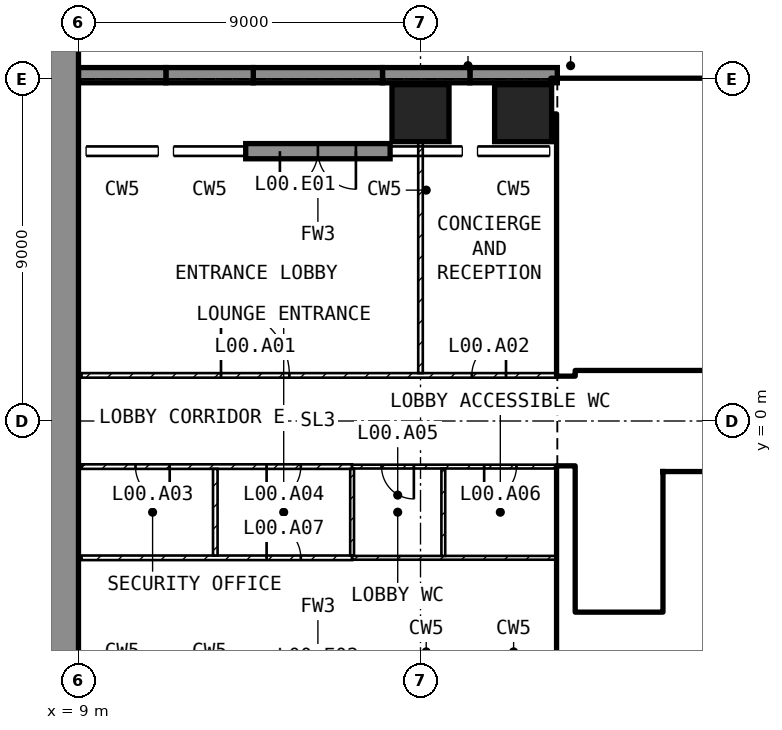
"""IFC4 building model, lengths in metres.
Left out: names, types, materials, properties, quantities, classifications, styles, units other than length and angle.
Written with IfcOpenShell. Run it as: python <this file> out.ifc"""

import sys

from ifc_helpers import new_model, si_unit, direction, frame, frame_2d, origin, origin_2d, place, context, subcontext, project, spatial, polyline, rectangle, outline, extrude, element, fill, save


model = new_model("IFC4")
c1 = context("Model", 3, precision=1e-05, world=origin(), true_north=direction((0.0, 1.0)))
c2 = subcontext(c1, "Body", "Model", "MODEL_VIEW")
j1 = project(units=[si_unit("LENGTHUNIT", "METRE"), si_unit("PLANEANGLEUNIT", "RADIAN")], contexts=[c1])
p1 = place(None, origin())
s1 = spatial("IfcSite", under=j1, at=p1, CompositionType="ELEMENT")
p2 = place(p1, origin())
s2 = spatial("IfcBuilding", under=s1, at=p2, CompositionType="ELEMENT")
p3 = place(p2, origin())
s3 = spatial("IfcBuildingStorey", under=s2, at=p3, CompositionType="ELEMENT", Elevation=0.0)
p4 = place(p3, frame((7.65, -25.2, -0.4), z_axis=(0.0, 0.0, 1.0), x_axis=(0.0, 1.0, 0.0)))
e1 = element("IfcWall", 1, at=p4, inside=s3, PredefinedType="SOLIDWALL", context=c2, shape_type="SweptSolid", body=[
    extrude(rectangle(XDim=50.4, YDim=2.7, at=frame_2d((25.2, 0.0))), origin(), (0.0, 0.0, 1.0), 20.0),
])
for number, where, z_axis, x_axis in (
    (2, (18.0, 8.1, -0.4), (0.0, 0.0, 1.0), (1.0, 0.0, 0.0)),
    (3, (20.7, 8.1, -0.4), (0.0, 0.0, 1.0), (1.0, 0.0, 0.0)),
):
    element("IfcColumn", number, at=place(p3, frame(where, z_axis=z_axis, x_axis=x_axis)), inside=s3, PredefinedType="COLUMN", context=c2, shape_type="SweptSolid", body=[
        extrude(rectangle(XDim=1.5, YDim=1.5, at=origin_2d()), origin(), (0.0, 0.0, 1.0), 15.1),
    ])
for number, where, z_axis, x_axis in (
    (4, (21.6, 8.9, 0.0), (0.0, 1.0, 0.0), (-1.0, 0.0, 0.0)),
    (5, (19.3, 8.9, 0.0), (0.0, 1.0, 0.0), (-1.0, 0.0, 0.0)),
):
    element("IfcWall", number, at=place(p3, frame(where, z_axis=z_axis, x_axis=x_axis)), inside=s3, PredefinedType="SOLIDWALL", context=c2, shape_type="SweptSolid", body=[
        extrude(outline(polyline([(0.0, 0.0), (0.3, 0.0), (0.3, 9.0), (0.316, 9.166), (0.365, 9.325), (0.443, 9.472), (0.549, 9.601), (0.678, 9.707), (0.825, 9.785), (0.984, 9.834), (1.15, 9.85), (1.316, 9.834), (1.475, 9.785), (1.622, 9.707), (1.751, 9.601), (1.857, 9.472), (1.935, 9.325), (1.984, 9.166), (2.0, 9.0), (2.0, 0.0), (2.3, 0.0), (2.3, 14.0), (0.0, 14.0), (0.0, 0.0)])), origin(), (0.0, 0.0, 1.0), 0.4),
    ])
p5 = place(p3, frame((17.0, 8.9, 0.0), z_axis=(0.0, 1.0, 0.0), x_axis=(-1.0, 0.0, 0.0)))
e6 = element("IfcWall", 6, at=p5, inside=s3, PredefinedType="SOLIDWALL", context=c2, shape_type="SweptSolid", body=[
    extrude(outline(polyline([(0.0, 0.0), (0.3, 0.0), (0.3, 9.0), (0.327, 9.273), (0.406, 9.536), (0.536, 9.778), (0.71, 9.99), (0.922, 10.164), (1.164, 10.293), (1.427, 10.373), (1.7, 10.4), (1.973, 10.373), (2.236, 10.293), (2.478, 10.164), (2.69, 9.99), (2.864, 9.778), (2.993, 9.536), (3.073, 9.273), (3.1, 9.0), (3.1, 0.0), (3.4, 0.0), (3.4, 14.0), (0.0, 14.0), (0.0, 0.0)])), origin(), (0.0, 0.0, 1.0), 0.4),
])
p6 = place(p3, frame((17.2, 7.1, 0.0), z_axis=(0.0, 0.0, 1.0), x_axis=(-1.0, 0.0, 0.0)))
e7 = element("IfcWall", 7, at=p6, inside=s3, PredefinedType="SOLIDWALL", context=c2, shape_type="SweptSolid", body=[
    extrude(rectangle(XDim=3.8, YDim=0.4, at=frame_2d((1.9, 0.0))), origin(), (0.0, 0.0, 1.0), 14.7),
])
p7 = place(p6, frame((0.9, 0.0, 0.0)))
e8 = element("IfcOpeningElement", 8, at=p7, cuts=e7, PredefinedType="OPENING", context=c2, shape_type="SweptSolid", body=[
    extrude(rectangle(XDim=2.0, YDim=2.4, at=frame_2d((1.0, 1.2))), frame((0.0, 0.21, 0.0), z_axis=(0.0, -1.0, 0.0), x_axis=(1.0, 0.0, 0.0)), (0.0, 0.0, 1.0), 0.42),
])
for number, where, z_axis, x_axis in (
    (9, (13.6, 8.9, 0.0), (0.0, 1.0, 0.0), (-1.0, 0.0, 0.0)),
    (10, (11.3, 8.9, 0.0), (0.0, 1.0, 0.0), (-1.0, 0.0, 0.0)),
):
    element("IfcWall", number, at=place(p3, frame(where, z_axis=z_axis, x_axis=x_axis)), inside=s3, PredefinedType="SOLIDWALL", context=c2, shape_type="SweptSolid", body=[
        extrude(outline(polyline([(0.0, 0.0), (0.3, 0.0), (0.3, 9.0), (0.316, 9.166), (0.365, 9.325), (0.443, 9.472), (0.549, 9.601), (0.678, 9.707), (0.825, 9.785), (0.984, 9.834), (1.15, 9.85), (1.316, 9.834), (1.475, 9.785), (1.622, 9.707), (1.751, 9.601), (1.857, 9.472), (1.935, 9.325), (1.984, 9.166), (2.0, 9.0), (2.0, 0.0), (2.3, 0.0), (2.3, 14.0), (0.0, 14.0), (0.0, 0.0)])), origin(), (0.0, 0.0, 1.0), 0.4),
    ])
p8 = place(p3, frame((21.45, 8.55, 0.0), z_axis=(0.0, 0.0, 1.0), x_axis=(1.0, 0.0, 0.0)))
e11 = element("IfcWall", 11, at=p8, inside=s3, PredefinedType="SHEAR", context=c2, shape_type="SweptSolid", body=[
    extrude(rectangle(XDim=10.05, YDim=0.9, at=frame_2d((5.025, 0.0))), origin(), (0.0, 0.0, 1.0), 14.7),
])
p9 = place(p8, frame((0.8, 0.0, 0.0)))
e12 = element("IfcOpeningElement", 12, at=p9, cuts=e11, PredefinedType="OPENING", context=c2, shape_type="SweptSolid", body=[
    extrude(rectangle(XDim=1.0, YDim=2.1, at=frame_2d((0.5, 1.05))), frame((0.0, 0.46, 0.0), z_axis=(0.0, -1.0, 0.0), x_axis=(1.0, 0.0, 0.0)), (0.0, 0.0, 1.0), 0.92),
])
for number, where, z_axis, x_axis in (
    (13, (21.825, -8.1, 0.0), (0.0, 0.0, 1.0), (0.0, 1.0, 0.0)),
    (14, (21.825, 1.2, 0.0), (0.0, 0.0, 1.0), (0.0, 1.0, 0.0)),
):
    element("IfcWall", number, at=place(p3, frame(where, z_axis=z_axis, x_axis=x_axis)), inside=s3, PredefinedType="SHEAR", context=c2, shape_type="SweptSolid", body=[
        extrude(rectangle(XDim=6.9, YDim=0.45, at=frame_2d((3.45, 0.0))), origin(), (0.0, 0.0, 1.0), 14.7),
    ])
p10 = place(p3, frame((22.05, 1.45, 0.0), z_axis=(0.0, 0.0, 1.0), x_axis=(1.0, 0.0, 0.0)))
e15 = element("IfcWall", 15, at=p10, inside=s3, PredefinedType="SOLIDWALL", context=c2, shape_type="SweptSolid", body=[
    extrude(rectangle(XDim=13.05, YDim=0.2, at=frame_2d((6.525, 0.0))), origin(), (0.0, 0.0, 1.0), 14.7),
])
p11 = place(p10, frame((8.6, 0.0, 0.0)))
e16 = element("IfcOpeningElement", 16, at=p11, cuts=e15, PredefinedType="OPENING", context=c2, shape_type="SweptSolid", body=[
    extrude(rectangle(XDim=1.0, YDim=2.1, at=frame_2d((0.5, 1.05))), frame((0.0, 0.11, 0.0), z_axis=(0.0, -1.0, 0.0), x_axis=(1.0, 0.0, 0.0)), (0.0, 0.0, 1.0), 0.22),
])
p12 = place(p10, frame((11.1, 0.0, 0.0)))
e17 = element("IfcOpeningElement", 17, at=p12, cuts=e15, PredefinedType="OPENING", context=c2, shape_type="SweptSolid", body=[
    extrude(rectangle(XDim=1.0, YDim=2.1, at=frame_2d((0.5, 1.05))), frame((0.0, 0.11, 0.0), z_axis=(0.0, -1.0, 0.0), x_axis=(1.0, 0.0, 0.0)), (0.0, 0.0, 1.0), 0.22),
])
p13 = place(p10, frame((0.75, 0.0, 0.0)))
e18 = element("IfcOpeningElement", 18, at=p13, cuts=e15, PredefinedType="OPENING", context=c2, shape_type="SweptSolid", body=[
    extrude(rectangle(XDim=1.0, YDim=2.1, at=frame_2d((0.5, 1.05))), frame((0.0, 0.11, 0.0), z_axis=(0.0, -1.0, 0.0), x_axis=(1.0, 0.0, 0.0)), (0.0, 0.0, 1.0), 0.22),
])
p14 = place(p10, frame((3.25, 0.0, 0.0)))
e19 = element("IfcOpeningElement", 19, at=p14, cuts=e15, PredefinedType="OPENING", context=c2, shape_type="SweptSolid", body=[
    extrude(rectangle(XDim=1.0, YDim=2.1, at=frame_2d((0.5, 1.05))), frame((0.0, 0.11, 0.0), z_axis=(0.0, -1.0, 0.0), x_axis=(1.0, 0.0, 0.0)), (0.0, 0.0, 1.0), 0.22),
])
p15 = place(p3, frame((24.5, -5.05, 0.0), z_axis=(0.0, 0.0, 1.0), x_axis=(0.0, 1.0, 0.0)))
e20 = element("IfcWall", 20, at=p15, inside=s3, PredefinedType="SOLIDWALL", context=c2, shape_type="SweptSolid", body=[
    extrude(rectangle(XDim=3.7, YDim=0.2, at=frame_2d((1.85, 0.0))), origin(), (0.0, 0.0, 1.0), 14.7),
])
p16 = place(p15, frame((0.1, 0.0, 0.0)))
e21 = element("IfcOpeningElement", 21, at=p16, cuts=e20, PredefinedType="OPENING", context=c2, shape_type="SweptSolid", body=[
    extrude(rectangle(XDim=0.8, YDim=2.1, at=frame_2d((0.4, 1.05))), frame((0.0, 0.11, 0.0), z_axis=(0.0, -1.0, 0.0), x_axis=(1.0, 0.0, 0.0)), (0.0, 0.0, 1.0), 0.22),
])
p17 = place(p3, frame((22.05, 5.15, 0.0), z_axis=(0.0, 0.0, 1.0), x_axis=(1.0, 0.0, 0.0)))
e22 = element("IfcWall", 22, at=p17, inside=s3, PredefinedType="SOLIDWALL", context=c2, shape_type="SweptSolid", body=[
    extrude(rectangle(XDim=6.3, YDim=0.2, at=frame_2d((3.15, 0.0))), origin(), (0.0, 0.0, 1.0), 14.7),
])
p18 = place(p17, frame((0.2, 0.0, 0.0)))
e23 = element("IfcOpeningElement", 23, at=p18, cuts=e22, PredefinedType="OPENING", context=c2, shape_type="SweptSolid", body=[
    extrude(rectangle(XDim=1.0, YDim=2.1, at=frame_2d((0.5, 1.05))), frame((0.0, 0.11, 0.0), z_axis=(0.0, -1.0, 0.0), x_axis=(1.0, 0.0, 0.0)), (0.0, 0.0, 1.0), 0.22),
])
p19 = place(p3, frame((22.05, -5.15, 0.0), z_axis=(0.0, 0.0, 1.0), x_axis=(1.0, 0.0, 0.0)))
e24 = element("IfcWall", 24, at=p19, inside=s3, PredefinedType="SOLIDWALL", context=c2, shape_type="SweptSolid", body=[
    extrude(rectangle(XDim=6.3, YDim=0.2, at=frame_2d((3.15, 0.0))), origin(), (0.0, 0.0, 1.0), 14.7),
])
p20 = place(p19, frame((0.2, 0.0, 0.0)))
e25 = element("IfcOpeningElement", 25, at=p20, cuts=e24, PredefinedType="OPENING", context=c2, shape_type="SweptSolid", body=[
    extrude(rectangle(XDim=1.0, YDim=2.1, at=frame_2d((0.5, 1.05))), frame((0.0, 0.11, 0.0), z_axis=(0.0, -1.0, 0.0), x_axis=(1.0, 0.0, 0.0)), (0.0, 0.0, 1.0), 0.22),
])
p21 = place(p3, frame((24.6, -1.45, 0.0), z_axis=(0.0, 0.0, 1.0), x_axis=(1.0, 0.0, 0.0)))
e26 = element("IfcWall", 26, at=p21, inside=s3, PredefinedType="SOLIDWALL", context=c2, shape_type="SweptSolid", body=[
    extrude(rectangle(XDim=10.5, YDim=0.2, at=frame_2d((5.25, 0.0))), origin(), (0.0, 0.0, 1.0), 14.7),
])
p22 = place(p21, frame((6.2, 0.0, 0.0)))
e27 = element("IfcOpeningElement", 27, at=p22, cuts=e26, PredefinedType="OPENING", context=c2, shape_type="SweptSolid", body=[
    extrude(rectangle(XDim=1.0, YDim=2.1, at=frame_2d((0.5, 1.05))), frame((0.0, 0.11, 0.0), z_axis=(0.0, -1.0, 0.0), x_axis=(1.0, 0.0, 0.0)), (0.0, 0.0, 1.0), 0.22),
])
p23 = place(p21, frame((7.75, 0.0, 0.0)))
e28 = element("IfcOpeningElement", 28, at=p23, cuts=e26, PredefinedType="OPENING", context=c2, shape_type="SweptSolid", body=[
    extrude(rectangle(XDim=1.0, YDim=2.1, at=frame_2d((0.5, 1.05))), frame((0.0, 0.11, 0.0), z_axis=(0.0, -1.0, 0.0), x_axis=(1.0, 0.0, 0.0)), (0.0, 0.0, 1.0), 0.22),
])
p24 = place(p21, frame((9.3, 0.0, 0.0)))
e29 = element("IfcOpeningElement", 29, at=p24, cuts=e26, PredefinedType="OPENING", context=c2, shape_type="SweptSolid", body=[
    extrude(rectangle(XDim=1.0, YDim=2.1, at=frame_2d((0.5, 1.05))), frame((0.0, 0.11, 0.0), z_axis=(0.0, -1.0, 0.0), x_axis=(1.0, 0.0, 0.0)), (0.0, 0.0, 1.0), 0.22),
])
p25 = place(p21, frame((0.45, 0.0, 0.0)))
e30 = element("IfcOpeningElement", 30, at=p25, cuts=e26, PredefinedType="OPENING", context=c2, shape_type="SweptSolid", body=[
    extrude(rectangle(XDim=0.9, YDim=2.1, at=frame_2d((0.45, 1.05))), frame((0.0, 0.11, 0.0), z_axis=(0.0, -1.0, 0.0), x_axis=(1.0, 0.0, 0.0)), (0.0, 0.0, 1.0), 0.22),
])
p26 = place(p21, frame((3.45, 0.0, 0.0)))
e31 = element("IfcOpeningElement", 31, at=p26, cuts=e26, PredefinedType="OPENING", context=c2, shape_type="SweptSolid", body=[
    extrude(rectangle(XDim=0.9, YDim=2.1, at=frame_2d((0.45, 1.05))), frame((0.0, 0.11, 0.0), z_axis=(0.0, -1.0, 0.0), x_axis=(1.0, 0.0, 0.0)), (0.0, 0.0, 1.0), 0.22),
])
p27 = place(p3, frame((24.6, -3.95, 0.0), z_axis=(0.0, 0.0, 1.0), x_axis=(1.0, 0.0, 0.0)))
e32 = element("IfcWall", 32, at=p27, inside=s3, PredefinedType="SOLIDWALL", context=c2, shape_type="SweptSolid", body=[
    extrude(rectangle(XDim=10.5, YDim=0.2, at=frame_2d((5.25, 0.0))), origin(), (0.0, 0.0, 1.0), 14.7),
])
p28 = place(p3, frame((9.08, 1.2, 0.0), z_axis=(0.0, 0.0, 1.0), x_axis=(1.0, 0.0, 0.0)))
e33 = element("IfcWall", 33, at=p28, inside=s3, PredefinedType="PARTITIONING", context=c2, shape_type="SweptSolid", body=[
    extrude(rectangle(XDim=12.52, YDim=0.12, at=frame_2d((6.26, 0.0))), origin(), (0.0, 0.0, 1.0), 14.7),
])
p29 = place(p28, frame((3.67, 0.0, 0.0)))
e34 = element("IfcOpeningElement", 34, at=p29, cuts=e33, PredefinedType="OPENING", context=c2, shape_type="SweptSolid", body=[
    extrude(rectangle(XDim=1.8, YDim=2.1, at=frame_2d((0.9, 1.05))), frame((0.0, 0.07, 0.0), z_axis=(0.0, -1.0, 0.0), x_axis=(1.0, 0.0, 0.0)), (0.0, 0.0, 1.0), 0.14),
])
p30 = place(p28, frame((10.27, 0.0, 0.0)))
e35 = element("IfcOpeningElement", 35, at=p30, cuts=e33, PredefinedType="OPENING", context=c2, shape_type="SweptSolid", body=[
    extrude(rectangle(XDim=0.9, YDim=2.1, at=frame_2d((0.45, 1.05))), frame((0.0, 0.07, 0.0), z_axis=(0.0, -1.0, 0.0), x_axis=(1.0, 0.0, 0.0)), (0.0, 0.0, 1.0), 0.14),
])
p31 = place(p3, frame((16.2, -1.2, 0.0), z_axis=(0.0, 0.0, 1.0), x_axis=(-1.0, 0.0, 0.0)))
e36 = element("IfcWall", 36, at=p31, inside=s3, PredefinedType="PARTITIONING", context=c2, shape_type="SweptSolid", body=[
    extrude(rectangle(XDim=7.12, YDim=0.12, at=frame_2d((3.56, 0.0))), origin(), (0.0, 0.0, 1.0), 14.7),
])
p32 = place(p31, frame((4.8, 0.0, 0.0)))
e37 = element("IfcOpeningElement", 37, at=p32, cuts=e36, PredefinedType="OPENING", context=c2, shape_type="SweptSolid", body=[
    extrude(rectangle(XDim=0.9, YDim=2.1, at=frame_2d((0.45, 1.05))), frame((0.0, 0.07, 0.0), z_axis=(0.0, -1.0, 0.0), x_axis=(1.0, 0.0, 0.0)), (0.0, 0.0, 1.0), 0.14),
])
p33 = place(p31, frame((1.35, 0.0, 0.0)))
e38 = element("IfcOpeningElement", 38, at=p33, cuts=e36, PredefinedType="OPENING", context=c2, shape_type="SweptSolid", body=[
    extrude(rectangle(XDim=0.9, YDim=2.1, at=frame_2d((0.45, 1.05))), frame((0.0, 0.07, 0.0), z_axis=(0.0, -1.0, 0.0), x_axis=(1.0, 0.0, 0.0)), (0.0, 0.0, 1.0), 0.14),
])
p34 = place(p3, frame((21.6, -1.2, 0.0), z_axis=(0.0, 0.0, 1.0), x_axis=(-1.0, 0.0, 0.0)))
e39 = element("IfcWall", 39, at=p34, inside=s3, PredefinedType="PARTITIONING", context=c2, shape_type="SweptSolid", body=[
    extrude(rectangle(XDim=5.4, YDim=0.1, at=frame_2d((2.7, 0.0))), origin(), (0.0, 0.0, 1.0), 14.7),
])
p35 = place(p34, frame((3.775, 0.0, 0.0)))
e40 = element("IfcOpeningElement", 40, at=p35, cuts=e39, PredefinedType="OPENING", context=c2, shape_type="SweptSolid", body=[
    extrude(rectangle(XDim=0.85, YDim=2.1, at=frame_2d((0.425, 1.05))), frame((0.0, 0.06, 0.0), z_axis=(0.0, -1.0, 0.0), x_axis=(1.0, 0.0, 0.0)), (0.0, 0.0, 1.0), 0.12),
])
p36 = place(p34, frame((1.075, 0.0, 0.0)))
e41 = element("IfcOpeningElement", 41, at=p36, cuts=e39, PredefinedType="OPENING", context=c2, shape_type="SweptSolid", body=[
    extrude(rectangle(XDim=0.85, YDim=2.1, at=frame_2d((0.425, 1.05))), frame((0.0, 0.06, 0.0), z_axis=(0.0, -1.0, 0.0), x_axis=(1.0, 0.0, 0.0)), (0.0, 0.0, 1.0), 0.12),
])
p37 = place(p3, frame((18.0, 7.35, 0.0), z_axis=(0.0, 0.0, 1.0), x_axis=(0.0, -1.0, 0.0)))
e42 = element("IfcWall", 42, at=p37, inside=s3, PredefinedType="PARTITIONING", context=c2, shape_type="SweptSolid", body=[
    extrude(rectangle(XDim=6.09, YDim=0.12, at=frame_2d((3.045, 0.0))), origin(), (0.0, 0.0, 1.0), 13.72),
])
p38 = place(p3, frame((9.08, -3.6, 0.0), z_axis=(0.0, 0.0, 1.0), x_axis=(1.0, 0.0, 0.0)))
e43 = element("IfcWall", 43, at=p38, inside=s3, PredefinedType="PARTITIONING", context=c2, shape_type="SweptSolid", body=[
    extrude(rectangle(XDim=7.12, YDim=0.12, at=frame_2d((3.56, 0.0))), origin(), (0.0, 0.0, 1.0), 14.7),
])
p39 = place(p38, frame((4.87, 0.0, 0.0)))
e44 = element("IfcOpeningElement", 44, at=p39, cuts=e43, PredefinedType="OPENING", context=c2, shape_type="SweptSolid", body=[
    extrude(rectangle(XDim=0.9, YDim=2.1, at=frame_2d((0.45, 1.05))), frame((0.0, 0.07, 0.0), z_axis=(0.0, -1.0, 0.0), x_axis=(1.0, 0.0, 0.0)), (0.0, 0.0, 1.0), 0.14),
])
p40 = place(p3, frame((16.2, -3.6, 0.0), z_axis=(0.0, 0.0, 1.0), x_axis=(1.0, 0.0, 0.0)))
e45 = element("IfcWall", 45, at=p40, inside=s3, PredefinedType="PARTITIONING", context=c2, shape_type="SweptSolid", body=[
    extrude(rectangle(XDim=5.4, YDim=0.1, at=frame_2d((2.7, 0.0))), origin(), (0.0, 0.0, 1.0), 14.7),
])
p41 = place(p3, frame((12.6, -1.26, 0.0), z_axis=(0.0, 0.0, 1.0), x_axis=(0.0, -1.0, 0.0)))
e46 = element("IfcWall", 46, at=p41, inside=s3, PredefinedType="PARTITIONING", context=c2, shape_type="SweptSolid", body=[
    extrude(rectangle(XDim=2.28, YDim=0.12, at=frame_2d((1.14, 0.0))), origin(), (0.0, 0.0, 1.0), 14.7),
])
p42 = place(p3, frame((16.2, -1.26, 0.0), z_axis=(0.0, 0.0, 1.0), x_axis=(0.0, -1.0, 0.0)))
e47 = element("IfcWall", 47, at=p42, inside=s3, PredefinedType="PARTITIONING", context=c2, shape_type="SweptSolid", body=[
    extrude(rectangle(XDim=2.28, YDim=0.1, at=frame_2d((1.14, 0.0))), origin(), (0.0, 0.0, 1.0), 14.7),
])
p43 = place(p3, frame((18.6, -1.25, 0.0), z_axis=(0.0, 0.0, 1.0), x_axis=(0.0, -1.0, 0.0)))
e48 = element("IfcWall", 48, at=p43, inside=s3, PredefinedType="PARTITIONING", context=c2, shape_type="SweptSolid", body=[
    extrude(rectangle(XDim=2.3, YDim=0.1, at=frame_2d((1.15, 0.0))), origin(), (0.0, 0.0, 1.0), 14.7),
])
p44 = place(p7, origin())
e49 = element("IfcDoor", 49, at=p44, inside=s3, OperationType="DOUBLE_DOOR_SINGLE_SWING", PredefinedType="DOOR", context=c2, shape_type="SweptSolid", body=[
    extrude(rectangle(XDim=2.0, YDim=2.4, at=frame_2d((1.0, 1.2))), frame((0.0, 0.025, 0.0), z_axis=(0.0, -1.0, 0.0), x_axis=(1.0, 0.0, 0.0)), (0.0, 0.0, 1.0), 0.05),
])
fill(e8, e49)
p45 = place(p20, origin())
e50 = element("IfcDoor", 50, at=p45, inside=s3, OperationType="SINGLE_SWING_LEFT", PredefinedType="DOOR", context=c2, shape_type="SweptSolid", body=[
    extrude(rectangle(XDim=1.0, YDim=2.1, at=frame_2d((0.5, 1.05))), frame((0.0, 0.025, 0.0), z_axis=(0.0, -1.0, 0.0), x_axis=(1.0, 0.0, 0.0)), (0.0, 0.0, 1.0), 0.05),
])
fill(e25, e50)
p46 = place(p18, origin())
e51 = element("IfcDoor", 51, at=p46, inside=s3, OperationType="SINGLE_SWING_LEFT", PredefinedType="DOOR", context=c2, shape_type="SweptSolid", body=[
    extrude(rectangle(XDim=1.0, YDim=2.1, at=frame_2d((0.5, 1.05))), frame((0.0, 0.025, 0.0), z_axis=(0.0, -1.0, 0.0), x_axis=(1.0, 0.0, 0.0)), (0.0, 0.0, 1.0), 0.05),
])
fill(e23, e51)
p47 = place(p9, origin())
e52 = element("IfcDoor", 52, at=p47, inside=s3, OperationType="SINGLE_SWING_LEFT", PredefinedType="DOOR", context=c2, shape_type="SweptSolid", body=[
    extrude(rectangle(XDim=1.0, YDim=2.1, at=frame_2d((0.5, 1.05))), frame((0.0, 0.025, 0.0), z_axis=(0.0, -1.0, 0.0), x_axis=(1.0, 0.0, 0.0)), (0.0, 0.0, 1.0), 0.05),
])
fill(e12, e52)
p48 = place(p13, origin())
e53 = element("IfcDoor", 53, at=p48, inside=s3, OperationType="SINGLE_SWING_LEFT", PredefinedType="DOOR", context=c2, shape_type="SweptSolid", body=[
    extrude(rectangle(XDim=1.0, YDim=2.1, at=frame_2d((0.5, 1.05))), frame((0.0, 0.025, 0.0), z_axis=(0.0, -1.0, 0.0), x_axis=(1.0, 0.0, 0.0)), (0.0, 0.0, 1.0), 0.05),
])
fill(e18, e53)
p49 = place(p16, origin())
e54 = element("IfcDoor", 54, at=p49, inside=s3, OperationType="SINGLE_SWING_LEFT", PredefinedType="DOOR", context=c2, shape_type="SweptSolid", body=[
    extrude(rectangle(XDim=0.8, YDim=2.1, at=frame_2d((0.4, 1.05))), frame((0.0, 0.025, 0.0), z_axis=(0.0, -1.0, 0.0), x_axis=(1.0, 0.0, 0.0)), (0.0, 0.0, 1.0), 0.05),
])
fill(e21, e54)
p50 = place(p25, origin())
e55 = element("IfcDoor", 55, at=p50, inside=s3, OperationType="SINGLE_SWING_LEFT", PredefinedType="DOOR", context=c2, shape_type="SweptSolid", body=[
    extrude(rectangle(XDim=0.9, YDim=2.1, at=frame_2d((0.45, 1.05))), frame((0.0, 0.025, 0.0), z_axis=(0.0, -1.0, 0.0), x_axis=(1.0, 0.0, 0.0)), (0.0, 0.0, 1.0), 0.05),
])
fill(e30, e55)
p51 = place(p14, origin())
e56 = element("IfcDoor", 56, at=p51, inside=s3, OperationType="SINGLE_SWING_LEFT", PredefinedType="DOOR", context=c2, shape_type="SweptSolid", body=[
    extrude(rectangle(XDim=1.0, YDim=2.1, at=frame_2d((0.5, 1.05))), frame((0.0, 0.025, 0.0), z_axis=(0.0, -1.0, 0.0), x_axis=(1.0, 0.0, 0.0)), (0.0, 0.0, 1.0), 0.05),
])
fill(e19, e56)
p52 = place(p29, origin())
e57 = element("IfcDoor", 57, at=p52, inside=s3, OperationType="SINGLE_SWING_LEFT", PredefinedType="DOOR", context=c2, shape_type="SweptSolid", body=[
    extrude(rectangle(XDim=1.8, YDim=2.1, at=frame_2d((0.9, 1.05))), frame((0.0, 0.025, 0.0), z_axis=(0.0, -1.0, 0.0), x_axis=(1.0, 0.0, 0.0)), (0.0, 0.0, 1.0), 0.05),
])
fill(e34, e57)
p53 = place(p30, origin())
e58 = element("IfcDoor", 58, at=p53, inside=s3, OperationType="SINGLE_SWING_RIGHT", PredefinedType="DOOR", context=c2, shape_type="SweptSolid", body=[
    extrude(rectangle(XDim=0.9, YDim=2.1, at=frame_2d((0.45, 1.05))), frame((0.0, 0.025, 0.0), z_axis=(0.0, -1.0, 0.0), x_axis=(1.0, 0.0, 0.0)), (0.0, 0.0, 1.0), 0.05),
])
fill(e35, e58)
p54 = place(p32, origin())
e59 = element("IfcDoor", 59, at=p54, inside=s3, OperationType="SINGLE_SWING_LEFT", PredefinedType="DOOR", context=c2, shape_type="SweptSolid", body=[
    extrude(rectangle(XDim=0.9, YDim=2.1, at=frame_2d((0.45, 1.05))), frame((0.0, 0.025, 0.0), z_axis=(0.0, -1.0, 0.0), x_axis=(1.0, 0.0, 0.0)), (0.0, 0.0, 1.0), 0.05),
])
fill(e37, e59)
p55 = place(p33, origin())
e60 = element("IfcDoor", 60, at=p55, inside=s3, OperationType="SINGLE_SWING_RIGHT", PredefinedType="DOOR", context=c2, shape_type="SweptSolid", body=[
    extrude(rectangle(XDim=0.9, YDim=2.1, at=frame_2d((0.45, 1.05))), frame((0.0, 0.025, 0.0), z_axis=(0.0, -1.0, 0.0), x_axis=(1.0, 0.0, 0.0)), (0.0, 0.0, 1.0), 0.05),
])
fill(e38, e60)
p56 = place(p35, origin())
e61 = element("IfcDoor", 61, at=p56, inside=s3, OperationType="SINGLE_SWING_LEFT", PredefinedType="DOOR", context=c2, shape_type="SweptSolid", body=[
    extrude(rectangle(XDim=0.85, YDim=2.1, at=frame_2d((0.425, 1.05))), frame((0.0, 0.025, 0.0), z_axis=(0.0, -1.0, 0.0), x_axis=(1.0, 0.0, 0.0)), (0.0, 0.0, 1.0), 0.05),
])
fill(e40, e61)
p57 = place(p36, origin())
e62 = element("IfcDoor", 62, at=p57, inside=s3, OperationType="SINGLE_SWING_RIGHT", PredefinedType="DOOR", context=c2, shape_type="SweptSolid", body=[
    extrude(rectangle(XDim=0.85, YDim=2.1, at=frame_2d((0.425, 1.05))), frame((0.0, 0.025, 0.0), z_axis=(0.0, -1.0, 0.0), x_axis=(1.0, 0.0, 0.0)), (0.0, 0.0, 1.0), 0.05),
])
fill(e41, e62)
p58 = place(p39, origin())
e63 = element("IfcDoor", 63, at=p58, inside=s3, OperationType="SINGLE_SWING_LEFT", PredefinedType="DOOR", context=c2, shape_type="SweptSolid", body=[
    extrude(rectangle(XDim=0.9, YDim=2.1, at=frame_2d((0.45, 1.05))), frame((0.0, 0.025, 0.0), z_axis=(0.0, -1.0, 0.0), x_axis=(1.0, 0.0, 0.0)), (0.0, 0.0, 1.0), 0.05),
])
fill(e44, e63)
save(model, sys.argv[1])
